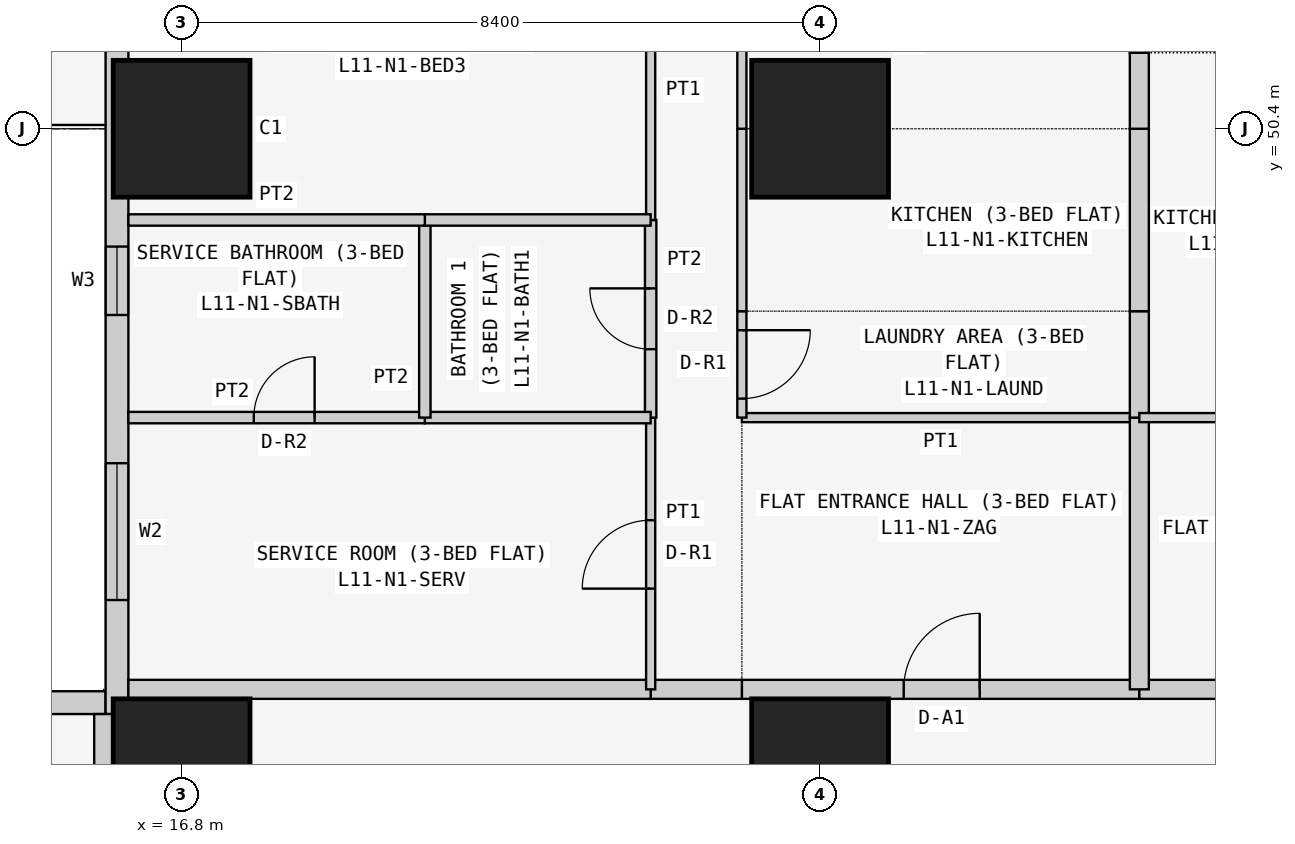
"""IFC4 building model, lengths in metres.
Left out: names, types, materials, properties, quantities, classifications, styles, units other than length and angle.
Written with IfcOpenShell. Run it as: python <this file> out.ifc"""

import sys

from ifc_helpers import new_model, si_unit, direction, frame, frame_2d, origin, origin_2d, place, context, subcontext, project, spatial, rectangle, extrude, element, fill, save


model = new_model("IFC4")
c1 = context("Model", 3, precision=1e-05, world=origin(), true_north=direction((0.0, 1.0)))
c2 = subcontext(c1, "Body", "Model", "MODEL_VIEW")
j1 = project(units=[si_unit("LENGTHUNIT", "METRE"), si_unit("PLANEANGLEUNIT", "RADIAN")], contexts=[c1])
p1 = place(None, origin())
s1 = spatial("IfcSite", under=j1, at=p1, CompositionType="ELEMENT")
p2 = place(p1, origin())
s2 = spatial("IfcBuilding", under=s1, at=p2, CompositionType="ELEMENT")
p3 = place(p2, frame((0.0, 0.0, 48.9)))
s3 = spatial("IfcBuildingStorey", under=s2, at=p3, CompositionType="ELEMENT", Elevation=48.9)
for number, where, z_axis, x_axis in (
    (1, (16.8, 42.0, 0.0), (0.0, 0.0, 1.0), (1.0, 0.0, 0.0)),
    (2, (16.8, 50.4, 0.0), (0.0, 0.0, 1.0), (1.0, 0.0, 0.0)),
    (3, (25.2, 42.0, 0.0), (0.0, 0.0, 1.0), (1.0, 0.0, 0.0)),
    (4, (25.2, 50.4, 0.0), (0.0, 0.0, 1.0), (1.0, 0.0, 0.0)),
):
    element("IfcColumn", number, at=place(p3, frame(where, z_axis=z_axis, x_axis=x_axis)), inside=s3, PredefinedType="COLUMN", context=c2, shape_type="SweptSolid", body=[
        extrude(rectangle(XDim=1.8, YDim=1.8, at=origin_2d()), origin(), (0.0, 0.0, 1.0), 3.6),
    ])
p4 = place(p3, frame((15.8, 42.85, 0.0), z_axis=(0.0, 0.0, 1.0), x_axis=(-1.0, 0.0, 0.0)))
e5 = element("IfcWall", 5, at=p4, inside=s3, PredefinedType="SOLIDWALL", context=c2, shape_type="SweptSolid", body=[
    extrude(rectangle(XDim=15.4, YDim=0.3, at=frame_2d((7.7, 0.0))), origin(), (0.0, 0.0, 1.0), 3.45),
])
p5 = place(p4, frame((1.2, 0.0, 0.9)))
e6 = element("IfcOpeningElement", 6, at=p5, cuts=e5, PredefinedType="OPENING", context=c2, shape_type="SweptSolid", body=[
    extrude(rectangle(XDim=1.8, YDim=1.5, at=frame_2d((0.9, 0.75))), frame((0.0, 0.16, 0.0), z_axis=(0.0, -1.0, 0.0), x_axis=(1.0, 0.0, 0.0)), (0.0, 0.0, 1.0), 0.32),
])
p6 = place(p4, frame((4.95, 0.0, 1.5)))
e7 = element("IfcOpeningElement", 7, at=p6, cuts=e5, PredefinedType="OPENING", context=c2, shape_type="SweptSolid", body=[
    extrude(rectangle(XDim=0.9, YDim=0.7, at=frame_2d((0.45, 0.35))), frame((0.0, 0.16, 0.0), z_axis=(0.0, -1.0, 0.0), x_axis=(1.0, 0.0, 0.0)), (0.0, 0.0, 1.0), 0.32),
])
p7 = place(p4, frame((8.5, 0.0, 0.9)))
e8 = element("IfcOpeningElement", 8, at=p7, cuts=e5, PredefinedType="OPENING", context=c2, shape_type="SweptSolid", body=[
    extrude(rectangle(XDim=1.8, YDim=1.5, at=frame_2d((0.9, 0.75))), frame((0.0, 0.16, 0.0), z_axis=(0.0, -1.0, 0.0), x_axis=(1.0, 0.0, 0.0)), (0.0, 0.0, 1.0), 0.32),
])
p8 = place(p4, frame((12.5, 0.0, 0.0)))
e9 = element("IfcOpeningElement", 9, at=p8, cuts=e5, PredefinedType="OPENING", context=c2, shape_type="SweptSolid", body=[
    extrude(rectangle(XDim=0.9, YDim=2.4, at=frame_2d((0.45, 1.2))), frame((0.0, 0.16, 0.0), z_axis=(0.0, -1.0, 0.0), x_axis=(1.0, 0.0, 0.0)), (0.0, 0.0, 1.0), 0.32),
])
p9 = place(p4, frame((13.5, 0.0, 0.9)))
e10 = element("IfcOpeningElement", 10, at=p9, cuts=e5, PredefinedType="OPENING", context=c2, shape_type="SweptSolid", body=[
    extrude(rectangle(XDim=1.2, YDim=1.5, at=frame_2d((0.6, 0.75))), frame((0.0, 0.16, 0.0), z_axis=(0.0, -1.0, 0.0), x_axis=(1.0, 0.0, 0.0)), (0.0, 0.0, 1.0), 0.32),
])
p10 = place(p3, frame((15.95, 58.4, 0.0), z_axis=(0.0, 0.0, 1.0), x_axis=(0.0, -1.0, 0.0)))
e11 = element("IfcWall", 11, at=p10, inside=s3, PredefinedType="SOLIDWALL", context=c2, shape_type="SweptSolid", body=[
    extrude(rectangle(XDim=15.7, YDim=0.3, at=frame_2d((7.85, 0.0))), origin(), (0.0, 0.0, 1.0), 3.45),
])
p11 = place(p10, frame((12.4, 0.0, 0.9)))
e12 = element("IfcOpeningElement", 12, at=p11, cuts=e11, PredefinedType="OPENING", context=c2, shape_type="SweptSolid", body=[
    extrude(rectangle(XDim=1.8, YDim=1.5, at=frame_2d((0.9, 0.75))), frame((0.0, 0.16, 0.0), z_axis=(0.0, -1.0, 0.0), x_axis=(1.0, 0.0, 0.0)), (0.0, 0.0, 1.0), 0.32),
])
p12 = place(p10, frame((9.55, 0.0, 1.5)))
e13 = element("IfcOpeningElement", 13, at=p12, cuts=e11, PredefinedType="OPENING", context=c2, shape_type="SweptSolid", body=[
    extrude(rectangle(XDim=0.9, YDim=0.7, at=frame_2d((0.45, 0.35))), frame((0.0, 0.16, 0.0), z_axis=(0.0, -1.0, 0.0), x_axis=(1.0, 0.0, 0.0)), (0.0, 0.0, 1.0), 0.32),
])
p13 = place(p10, frame((5.1, 0.0, 0.9)))
e14 = element("IfcOpeningElement", 14, at=p13, cuts=e11, PredefinedType="OPENING", context=c2, shape_type="SweptSolid", body=[
    extrude(rectangle(XDim=1.8, YDim=1.5, at=frame_2d((0.9, 0.75))), frame((0.0, 0.16, 0.0), z_axis=(0.0, -1.0, 0.0), x_axis=(1.0, 0.0, 0.0)), (0.0, 0.0, 1.0), 0.32),
])
p14 = place(p10, frame((2.0, 0.0, 0.0)))
e15 = element("IfcOpeningElement", 15, at=p14, cuts=e11, PredefinedType="OPENING", context=c2, shape_type="SweptSolid", body=[
    extrude(rectangle(XDim=0.9, YDim=2.4, at=frame_2d((0.45, 1.2))), frame((0.0, 0.16, 0.0), z_axis=(0.0, -1.0, 0.0), x_axis=(1.0, 0.0, 0.0)), (0.0, 0.0, 1.0), 0.32),
])
p15 = place(p10, frame((0.7, 0.0, 0.9)))
e16 = element("IfcOpeningElement", 16, at=p15, cuts=e11, PredefinedType="OPENING", context=c2, shape_type="SweptSolid", body=[
    extrude(rectangle(XDim=1.2, YDim=1.5, at=frame_2d((0.6, 0.75))), frame((0.0, 0.16, 0.0), z_axis=(0.0, -1.0, 0.0), x_axis=(1.0, 0.0, 0.0)), (0.0, 0.0, 1.0), 0.32),
])
p16 = place(p3, frame((24.171, 43.025, 0.0), z_axis=(0.0, 0.0, 1.0), x_axis=(1.0, 0.0, 0.0)))
e17 = element("IfcWall", 17, at=p16, inside=s3, PredefinedType="PARTITIONING", context=c2, shape_type="SweptSolid", body=[
    extrude(rectangle(XDim=5.229, YDim=0.25, at=frame_2d((2.615, 0.0))), origin(), (0.0, 0.0, 1.0), 3.45),
])
p17 = place(p16, frame((2.129, 0.0, 0.0)))
e18 = element("IfcOpeningElement", 18, at=p17, cuts=e17, PredefinedType="OPENING", context=c2, shape_type="SweptSolid", body=[
    extrude(rectangle(XDim=1.0, YDim=2.1, at=frame_2d((0.5, 1.05))), frame((0.0, 0.135, 0.0), z_axis=(0.0, -1.0, 0.0), x_axis=(1.0, 0.0, 0.0)), (0.0, 0.0, 1.0), 0.27),
])
p18 = place(p3, frame((22.971, 43.025, 0.0), z_axis=(0.0, 0.0, 1.0), x_axis=(1.0, 0.0, 0.0)))
e19 = element("IfcWall", 19, at=p18, inside=s3, PredefinedType="PARTITIONING", context=c2, shape_type="SweptSolid", body=[
    extrude(rectangle(XDim=1.2, YDim=0.25, at=frame_2d((0.6, 0.0))), origin(), (0.0, 0.0, 1.0), 3.45),
])
p19 = place(p3, frame((16.1, 43.025, 0.0), z_axis=(0.0, 0.0, 1.0), x_axis=(1.0, 0.0, 0.0)))
e20 = element("IfcWall", 20, at=p19, inside=s3, PredefinedType="PARTITIONING", context=c2, shape_type="SweptSolid", body=[
    extrude(rectangle(XDim=6.871, YDim=0.25, at=frame_2d((3.436, 0.0))), origin(), (0.0, 0.0, 1.0), 3.45),
])
p20 = place(p3, frame((29.4, 43.025, 0.0), z_axis=(0.0, 0.0, 1.0), x_axis=(1.0, 0.0, 0.0)))
e21 = element("IfcWall", 21, at=p20, inside=s3, PredefinedType="PARTITIONING", context=c2, shape_type="SweptSolid", body=[
    extrude(rectangle(XDim=5.229, YDim=0.25, at=frame_2d((2.615, 0.0))), origin(), (0.0, 0.0, 1.0), 3.45),
])
p21 = place(p20, frame((2.1, 0.0, 0.0)))
e22 = element("IfcOpeningElement", 22, at=p21, cuts=e21, PredefinedType="OPENING", context=c2, shape_type="SweptSolid", body=[
    extrude(rectangle(XDim=1.0, YDim=2.1, at=frame_2d((0.5, 1.05))), frame((0.0, 0.135, 0.0), z_axis=(0.0, -1.0, 0.0), x_axis=(1.0, 0.0, 0.0)), (0.0, 0.0, 1.0), 0.27),
])
p22 = place(p3, frame((15.775, 36.229, 0.0), z_axis=(0.0, 0.0, 1.0), x_axis=(0.0, 1.0, 0.0)))
e23 = element("IfcWall", 23, at=p22, inside=s3, PredefinedType="PARTITIONING", context=c2, shape_type="SweptSolid", body=[
    extrude(rectangle(XDim=6.471, YDim=0.25, at=frame_2d((3.235, 0.0))), origin(), (0.0, 0.0, 1.0), 3.45),
])
p23 = place(p3, frame((29.4, 46.6, 0.0), z_axis=(0.0, 0.0, 1.0), x_axis=(-1.0, 0.0, 0.0)))
e24 = element("IfcWall", 24, at=p23, inside=s3, PredefinedType="PARTITIONING", context=c2, shape_type="SweptSolid", body=[
    extrude(rectangle(XDim=5.229, YDim=0.12, at=frame_2d((2.615, 0.0))), origin(), (0.0, 0.0, 1.0), 3.45),
])
p24 = place(p3, frame((29.4, 43.025, 0.0), z_axis=(0.0, 0.0, 1.0), x_axis=(0.0, 1.0, 0.0)))
e25 = element("IfcWall", 25, at=p24, inside=s3, PredefinedType="PARTITIONING", context=c2, shape_type="SweptSolid", body=[
    extrude(rectangle(XDim=3.575, YDim=0.25, at=frame_2d((1.788, 0.0))), origin(), (0.0, 0.0, 1.0), 2.848),
])
p25 = place(p3, frame((24.171, 48.0, 0.0), z_axis=(0.0, 0.0, 1.0), x_axis=(0.0, -1.0, 0.0)))
e26 = element("IfcWall", 26, at=p25, inside=s3, PredefinedType="PARTITIONING", context=c2, shape_type="SweptSolid", body=[
    extrude(rectangle(XDim=1.4, YDim=0.12, at=frame_2d((0.7, 0.0))), origin(), (0.0, 0.0, 1.0), 3.45),
])
p26 = place(p25, frame((0.25, 0.0, 0.0)))
e27 = element("IfcOpeningElement", 27, at=p26, cuts=e26, PredefinedType="OPENING", context=c2, shape_type="SweptSolid", body=[
    extrude(rectangle(XDim=0.9, YDim=2.1, at=frame_2d((0.45, 1.05))), frame((0.0, 0.07, 0.0), z_axis=(0.0, -1.0, 0.0), x_axis=(1.0, 0.0, 0.0)), (0.0, 0.0, 1.0), 0.14),
])
p27 = place(p3, frame((29.4, 46.6, 0.0), z_axis=(0.0, 0.0, 1.0), x_axis=(0.0, 1.0, 0.0)))
e28 = element("IfcWall", 28, at=p27, inside=s3, PredefinedType="PARTITIONING", context=c2, shape_type="SweptSolid", body=[
    extrude(rectangle(XDim=1.4, YDim=0.25, at=frame_2d((0.7, 0.0))), origin(), (0.0, 0.0, 1.0), 2.848),
])
p28 = place(p3, frame((24.171, 50.4, 0.0), z_axis=(0.0, 0.0, 1.0), x_axis=(0.0, -1.0, 0.0)))
e29 = element("IfcWall", 29, at=p28, inside=s3, PredefinedType="PARTITIONING", context=c2, shape_type="SweptSolid", body=[
    extrude(rectangle(XDim=2.4, YDim=0.12, at=frame_2d((1.2, 0.0))), origin(), (0.0, 0.0, 1.0), 3.45),
])
p29 = place(p3, frame((29.4, 48.0, 0.0), z_axis=(0.0, 0.0, 1.0), x_axis=(0.0, 1.0, 0.0)))
e30 = element("IfcWall", 30, at=p29, inside=s3, PredefinedType="PARTITIONING", context=c2, shape_type="SweptSolid", body=[
    extrude(rectangle(XDim=2.4, YDim=0.25, at=frame_2d((1.2, 0.0))), origin(), (0.0, 0.0, 1.0), 2.848),
])
p30 = place(p3, frame((24.171, 55.3, 0.0), z_axis=(0.0, 0.0, 1.0), x_axis=(0.0, -1.0, 0.0)))
e31 = element("IfcWall", 31, at=p30, inside=s3, PredefinedType="PARTITIONING", context=c2, shape_type="SweptSolid", body=[
    extrude(rectangle(XDim=4.9, YDim=0.12, at=frame_2d((2.45, 0.0))), origin(), (0.0, 0.0, 1.0), 3.45),
])
p31 = place(p30, frame((1.25, 0.0, 0.0)))
e32 = element("IfcOpeningElement", 32, at=p31, cuts=e31, PredefinedType="OPENING", context=c2, shape_type="SweptSolid", body=[
    extrude(rectangle(XDim=0.9, YDim=2.1, at=frame_2d((0.45, 1.05))), frame((0.0, 0.07, 0.0), z_axis=(0.0, -1.0, 0.0), x_axis=(1.0, 0.0, 0.0)), (0.0, 0.0, 1.0), 0.14),
])
p32 = place(p3, frame((29.4, 50.4, 0.0), z_axis=(0.0, 0.0, 1.0), x_axis=(0.0, 1.0, 0.0)))
e33 = element("IfcWall", 33, at=p32, inside=s3, PredefinedType="PARTITIONING", context=c2, shape_type="SweptSolid", body=[
    extrude(rectangle(XDim=1.0, YDim=0.25, at=frame_2d((0.5, 0.0))), origin(), (0.0, 0.0, 1.0), 2.848),
])
p33 = place(p3, frame((29.4, 51.4, 0.0), z_axis=(0.0, 0.0, 1.0), x_axis=(0.0, 1.0, 0.0)))
e34 = element("IfcWall", 34, at=p33, inside=s3, PredefinedType="PARTITIONING", context=c2, shape_type="SweptSolid", body=[
    extrude(rectangle(XDim=8.05, YDim=0.25, at=frame_2d((4.025, 0.0))), origin(), (0.0, 0.0, 1.0), 2.848),
])
p34 = place(p3, frame((22.971, 46.6, 0.0), z_axis=(0.0, 0.0, 1.0), x_axis=(0.0, -1.0, 0.0)))
e35 = element("IfcWall", 35, at=p34, inside=s3, PredefinedType="PARTITIONING", context=c2, shape_type="SweptSolid", body=[
    extrude(rectangle(XDim=3.575, YDim=0.12, at=frame_2d((1.788, 0.0))), origin(), (0.0, 0.0, 1.0), 3.45),
])
p35 = place(p34, frame((1.35, 0.0, 0.0)))
e36 = element("IfcOpeningElement", 36, at=p35, cuts=e35, PredefinedType="OPENING", context=c2, shape_type="SweptSolid", body=[
    extrude(rectangle(XDim=0.9, YDim=2.1, at=frame_2d((0.45, 1.05))), frame((0.0, 0.07, 0.0), z_axis=(0.0, -1.0, 0.0), x_axis=(1.0, 0.0, 0.0)), (0.0, 0.0, 1.0), 0.14),
])
p36 = place(p3, frame((22.971, 49.2, 0.0), z_axis=(0.0, 0.0, 1.0), x_axis=(0.0, -1.0, 0.0)))
e37 = element("IfcWall", 37, at=p36, inside=s3, PredefinedType="PARTITIONING", context=c2, shape_type="SweptSolid", body=[
    extrude(rectangle(XDim=2.6, YDim=0.15, at=frame_2d((1.3, 0.0))), origin(), (0.0, 0.0, 1.0), 3.45),
])
p37 = place(p36, frame((0.9, 0.0, 0.0)))
e38 = element("IfcOpeningElement", 38, at=p37, cuts=e37, PredefinedType="OPENING", context=c2, shape_type="SweptSolid", body=[
    extrude(rectangle(XDim=0.8, YDim=2.1, at=frame_2d((0.4, 1.05))), frame((0.0, 0.085, 0.0), z_axis=(0.0, -1.0, 0.0), x_axis=(1.0, 0.0, 0.0)), (0.0, 0.0, 1.0), 0.17),
])
p38 = place(p3, frame((22.971, 54.1, 0.0), z_axis=(0.0, 0.0, 1.0), x_axis=(0.0, -1.0, 0.0)))
e39 = element("IfcWall", 39, at=p38, inside=s3, PredefinedType="PARTITIONING", context=c2, shape_type="SweptSolid", body=[
    extrude(rectangle(XDim=4.9, YDim=0.12, at=frame_2d((2.45, 0.0))), origin(), (0.0, 0.0, 1.0), 3.45),
])
p39 = place(p38, frame((1.65, 0.0, 0.0)))
e40 = element("IfcOpeningElement", 40, at=p39, cuts=e39, PredefinedType="OPENING", context=c2, shape_type="SweptSolid", body=[
    extrude(rectangle(XDim=0.9, YDim=2.1, at=frame_2d((0.45, 1.05))), frame((0.0, 0.07, 0.0), z_axis=(0.0, -1.0, 0.0), x_axis=(1.0, 0.0, 0.0)), (0.0, 0.0, 1.0), 0.14),
])
p40 = place(p3, frame((22.971, 46.6, 0.0), z_axis=(0.0, 0.0, 1.0), x_axis=(-1.0, 0.0, 0.0)))
e41 = element("IfcWall", 41, at=p40, inside=s3, PredefinedType="PARTITIONING", context=c2, shape_type="SweptSolid", body=[
    extrude(rectangle(XDim=2.971, YDim=0.15, at=frame_2d((1.485, 0.0))), origin(), (0.0, 0.0, 1.0), 3.45),
])
p41 = place(p3, frame((20.0, 46.6, 0.0), z_axis=(0.0, 0.0, 1.0), x_axis=(-1.0, 0.0, 0.0)))
e42 = element("IfcWall", 42, at=p41, inside=s3, PredefinedType="PARTITIONING", context=c2, shape_type="SweptSolid", body=[
    extrude(rectangle(XDim=3.9, YDim=0.15, at=frame_2d((1.95, 0.0))), origin(), (0.0, 0.0, 1.0), 3.45),
])
p42 = place(p41, frame((1.45, 0.0, 0.0)))
e43 = element("IfcOpeningElement", 43, at=p42, cuts=e42, PredefinedType="OPENING", context=c2, shape_type="SweptSolid", body=[
    extrude(rectangle(XDim=0.8, YDim=2.1, at=frame_2d((0.4, 1.05))), frame((0.0, 0.085, 0.0), z_axis=(0.0, -1.0, 0.0), x_axis=(1.0, 0.0, 0.0)), (0.0, 0.0, 1.0), 0.17),
])
p43 = place(p3, frame((20.0, 49.2, 0.0), z_axis=(0.0, 0.0, 1.0), x_axis=(0.0, -1.0, 0.0)))
e44 = element("IfcWall", 44, at=p43, inside=s3, PredefinedType="PARTITIONING", context=c2, shape_type="SweptSolid", body=[
    extrude(rectangle(XDim=2.6, YDim=0.15, at=frame_2d((1.3, 0.0))), origin(), (0.0, 0.0, 1.0), 3.45),
])
p44 = place(p3, frame((22.971, 49.2, 0.0), z_axis=(0.0, 0.0, 1.0), x_axis=(-1.0, 0.0, 0.0)))
e45 = element("IfcWall", 45, at=p44, inside=s3, PredefinedType="PARTITIONING", context=c2, shape_type="SweptSolid", body=[
    extrude(rectangle(XDim=2.971, YDim=0.15, at=frame_2d((1.485, 0.0))), origin(), (0.0, 0.0, 1.0), 3.45),
])
p45 = place(p3, frame((20.0, 49.2, 0.0), z_axis=(0.0, 0.0, 1.0), x_axis=(-1.0, 0.0, 0.0)))
e46 = element("IfcWall", 46, at=p45, inside=s3, PredefinedType="PARTITIONING", context=c2, shape_type="SweptSolid", body=[
    extrude(rectangle(XDim=3.9, YDim=0.15, at=frame_2d((1.95, 0.0))), origin(), (0.0, 0.0, 1.0), 3.45),
])
p46 = place(p3, frame((29.4, 46.6, 0.0), z_axis=(0.0, 0.0, 1.0), x_axis=(1.0, 0.0, 0.0)))
e47 = element("IfcWall", 47, at=p46, inside=s3, PredefinedType="PARTITIONING", context=c2, shape_type="SweptSolid", body=[
    extrude(rectangle(XDim=5.229, YDim=0.12, at=frame_2d((2.615, 0.0))), origin(), (0.0, 0.0, 1.0), 3.45),
])
p47 = place(p46, frame((1.05, 0.0, 0.0)))
e48 = element("IfcOpeningElement", 48, at=p47, cuts=e47, PredefinedType="OPENING", context=c2, shape_type="SweptSolid", body=[
    extrude(rectangle(XDim=0.9, YDim=2.1, at=frame_2d((0.45, 1.05))), frame((0.0, 0.07, 0.0), z_axis=(0.0, -1.0, 0.0), x_axis=(1.0, 0.0, 0.0)), (0.0, 0.0, 1.0), 0.14),
])
p48 = place(p11, origin())
e49 = element("IfcWindow", 49, at=p48, inside=s3, PartitioningType="SINGLE_PANEL", PredefinedType="WINDOW", context=c2, shape_type="SweptSolid", body=[
    extrude(rectangle(XDim=1.8, YDim=1.5, at=frame_2d((0.9, 0.75))), frame((0.0, 0.03, 0.0), z_axis=(0.0, -1.0, 0.0), x_axis=(1.0, 0.0, 0.0)), (0.0, 0.0, 1.0), 0.06),
])
fill(e12, e49)
p49 = place(p12, origin())
e50 = element("IfcWindow", 50, at=p49, inside=s3, PartitioningType="SINGLE_PANEL", PredefinedType="WINDOW", context=c2, shape_type="SweptSolid", body=[
    extrude(rectangle(XDim=0.9, YDim=0.7, at=frame_2d((0.45, 0.35))), frame((0.0, 0.03, 0.0), z_axis=(0.0, -1.0, 0.0), x_axis=(1.0, 0.0, 0.0)), (0.0, 0.0, 1.0), 0.06),
])
fill(e13, e50)
p50 = place(p17, origin())
e51 = element("IfcDoor", 51, at=p50, inside=s3, OperationType="SINGLE_SWING_RIGHT", PredefinedType="DOOR", context=c2, shape_type="SweptSolid", body=[
    extrude(rectangle(XDim=1.0, YDim=2.1, at=frame_2d((0.5, 1.05))), frame((0.0, 0.025, 0.0), z_axis=(0.0, -1.0, 0.0), x_axis=(1.0, 0.0, 0.0)), (0.0, 0.0, 1.0), 0.05),
])
fill(e18, e51)
p51 = place(p26, origin())
e52 = element("IfcDoor", 52, at=p51, inside=s3, OperationType="SINGLE_SWING_LEFT", PredefinedType="DOOR", context=c2, shape_type="SweptSolid", body=[
    extrude(rectangle(XDim=0.9, YDim=2.1, at=frame_2d((0.45, 1.05))), frame((0.0, 0.025, 0.0), z_axis=(0.0, -1.0, 0.0), x_axis=(1.0, 0.0, 0.0)), (0.0, 0.0, 1.0), 0.05),
])
fill(e27, e52)
p52 = place(p35, frame((0.9, 0.0, 0.0), z_axis=(0.0, 0.0, 1.0), x_axis=(-1.0, 0.0, 0.0)))
e53 = element("IfcDoor", 53, at=p52, inside=s3, OperationType="SINGLE_SWING_LEFT", PredefinedType="DOOR", context=c2, shape_type="SweptSolid", body=[
    extrude(rectangle(XDim=0.9, YDim=2.1, at=frame_2d((0.45, 1.05))), frame((0.0, 0.025, 0.0), z_axis=(0.0, -1.0, 0.0), x_axis=(1.0, 0.0, 0.0)), (0.0, 0.0, 1.0), 0.05),
])
fill(e36, e53)
p53 = place(p42, frame((0.8, 0.0, 0.0), z_axis=(0.0, 0.0, 1.0), x_axis=(-1.0, 0.0, 0.0)))
e54 = element("IfcDoor", 54, at=p53, inside=s3, OperationType="SINGLE_SWING_RIGHT", PredefinedType="DOOR", context=c2, shape_type="SweptSolid", body=[
    extrude(rectangle(XDim=0.8, YDim=2.1, at=frame_2d((0.4, 1.05))), frame((0.0, 0.025, 0.0), z_axis=(0.0, -1.0, 0.0), x_axis=(1.0, 0.0, 0.0)), (0.0, 0.0, 1.0), 0.05),
])
fill(e43, e54)
p54 = place(p37, frame((0.8, 0.0, 0.0), z_axis=(0.0, 0.0, 1.0), x_axis=(-1.0, 0.0, 0.0)))
e55 = element("IfcDoor", 55, at=p54, inside=s3, OperationType="SINGLE_SWING_RIGHT", PredefinedType="DOOR", context=c2, shape_type="SweptSolid", body=[
    extrude(rectangle(XDim=0.8, YDim=2.1, at=frame_2d((0.4, 1.05))), frame((0.0, 0.025, 0.0), z_axis=(0.0, -1.0, 0.0), x_axis=(1.0, 0.0, 0.0)), (0.0, 0.0, 1.0), 0.05),
])
fill(e38, e55)
save(model, sys.argv[1])
